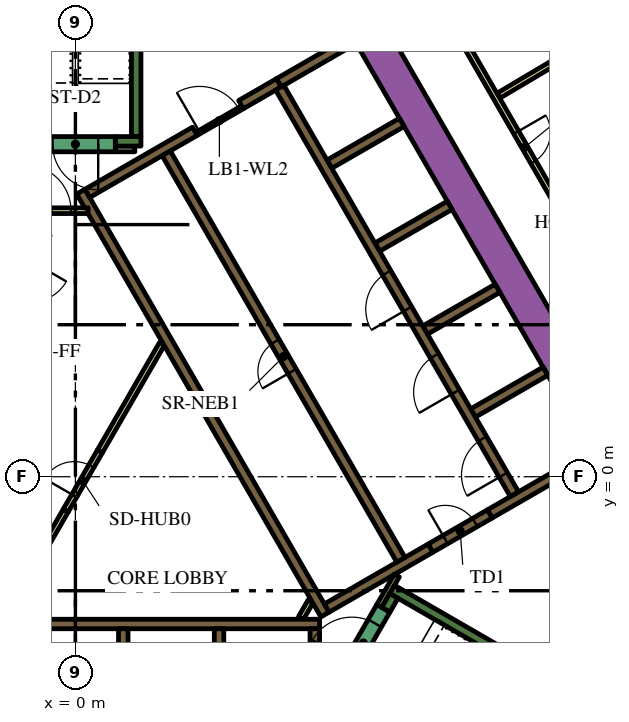
"""IFC4 building model, lengths in metres.
Left out: names, types, materials, properties, quantities, classifications, styles, units other than length and angle.
Written with IfcOpenShell. Run it as: python <this file> out.ifc"""

import sys

from ifc_helpers import new_model, si_unit, direction, frame, frame_2d, origin, place, context, subcontext, project, spatial, polyline, rectangle, outline, extrude, element, fill, save


model = new_model("IFC4")
c1 = context("Model", 3, precision=1e-05, world=origin(), true_north=direction((0.0, 1.0)))
c2 = subcontext(c1, "Body", "Model", "MODEL_VIEW")
j1 = project(units=[si_unit("LENGTHUNIT", "METRE"), si_unit("PLANEANGLEUNIT", "RADIAN")], contexts=[c1])
p1 = place(None, origin())
s1 = spatial("IfcSite", under=j1, at=p1, CompositionType="ELEMENT")
p2 = place(p1, origin())
s2 = spatial("IfcBuilding", under=s1, at=p2, CompositionType="ELEMENT")
p3 = place(p2, frame((0.0, 0.0, 87.6)))
s3 = spatial("IfcBuildingStorey", under=s2, at=p3, CompositionType="ELEMENT", Elevation=87.6)
p4 = place(p3, frame((6.776, 13.364, 0.0), z_axis=(0.0, 0.0, 1.0), x_axis=(0.500004177138, -0.8660229921, 0.0)))
e1 = element("IfcWall", 1, at=p4, inside=s3, PredefinedType="SOLIDWALL", context=c2, shape_type="SweptSolid", body=[
    extrude(rectangle(XDim=20.204, YDim=0.9, at=frame_2d((10.102, 0.0))), origin(), (0.0, 0.0, 1.0), 3.9),
])
p5 = place(p3, frame((11.695, -12.644, 0.0), z_axis=(0.0, 0.0, 1.0), x_axis=(0.500010229568, 0.86601949766, 0.0)))
e2 = element("IfcWall", 2, at=p5, inside=s3, PredefinedType="SOLIDWALL", context=c2, shape_type="SweptSolid", body=[
    extrude(rectangle(XDim=9.326, YDim=0.9, at=frame_2d((4.663, 0.0))), origin(), (0.0, 0.0, 1.0), 3.9),
])
p6 = place(p3, frame((8.334, -2.964, 0.0), z_axis=(0.0, 0.0, 1.0), x_axis=(0.866016039709, -0.500016218704, 0.0)))
e3 = element("IfcWall", 3, at=p6, inside=s3, PredefinedType="SOLIDWALL", context=c2, shape_type="SweptSolid", body=[
    extrude(rectangle(XDim=7.05, YDim=0.25, at=frame_2d((3.525, 0.0))), origin(), (0.0, 0.0, 1.0), 3.9),
])
p7 = place(p3, frame((8.168, -3.503, 0.0), z_axis=(0.0, 0.0, 1.0), x_axis=(0.49972245349, 0.866185586049, 0.0)))
e4 = element("IfcWall", 4, at=p7, inside=s3, PredefinedType="SOLIDWALL", context=c2, shape_type="SweptSolid", body=[
    extrude(rectangle(XDim=0.425, YDim=0.25, at=frame_2d((0.212, 0.0))), origin(), (0.0, 0.0, 1.0), 3.9),
])
p8 = place(p3, frame((1.6, 8.95, 0.0), z_axis=(0.0, 0.0, 1.0), x_axis=(0.0, 1.0, 0.0)))
e5 = element("IfcWall", 5, at=p8, inside=s3, PredefinedType="SOLIDWALL", context=c2, shape_type="SweptSolid", body=[
    extrude(rectangle(XDim=6.8, YDim=0.25, at=frame_2d((3.4, 0.0))), origin(), (0.0, 0.0, 1.0), 3.9),
])
p9 = place(p3, frame((1.05, 8.825, 0.0), z_axis=(0.0, 0.0, 1.0), x_axis=(1.0, 0.0, 0.0)))
e6 = element("IfcWall", 6, at=p9, inside=s3, PredefinedType="SOLIDWALL", context=c2, shape_type="SweptSolid", body=[
    extrude(rectangle(XDim=0.675, YDim=0.25, at=frame_2d((0.337, 0.0))), origin(), (0.0, 0.0, 1.0), 3.9),
])
p10 = place(p3, frame((-5.845, -3.875, 0.0), z_axis=(0.0, 0.0, 1.0), x_axis=(1.0, 0.0, 0.0)))
e7 = element("IfcWall", 7, at=p10, inside=s3, PredefinedType="SOLIDWALL", context=c2, shape_type="SweptSolid", body=[
    extrude(rectangle(XDim=12.27, YDim=0.25, at=frame_2d((6.135, 0.0))), origin(), (0.0, 0.0, 1.0), 3.9),
])
p11 = place(p3, frame((6.3, -7.268, 0.0), z_axis=(0.0, 0.0, 1.0), x_axis=(0.0, 1.0, 0.0)))
e8 = element("IfcWall", 8, at=p11, inside=s3, PredefinedType="SOLIDWALL", context=c2, shape_type="SweptSolid", body=[
    extrude(rectangle(XDim=3.268, YDim=0.25, at=frame_2d((1.634, 0.0))), origin(), (0.0, 0.0, 1.0), 3.9),
])
for number, where, z_axis, x_axis in (
    (9, (3.78, -4.0, 0.0), (0.0, 0.0, 1.0), (0.0, -1.0, 0.0)),
    (10, (1.26, -4.0, 0.0), (0.0, 0.0, 1.0), (0.0, -1.0, 0.0)),
    (11, (10.464, 1.677, 0.0), (0.0, 0.0, 1.0), (0.866, 0.5, 0.0)),
):
    element("IfcWall", number, at=place(p3, frame(where, z_axis=z_axis, x_axis=x_axis)), inside=s3, PredefinedType="SOLIDWALL", context=c2, shape_type="SweptSolid", body=[
        extrude(rectangle(XDim=2.2, YDim=0.25, at=frame_2d((1.1, 0.0))), origin(), (0.0, 0.0, 1.0), 3.9),
    ])
p12 = place(p3, frame((13.629, 0.594, 0.0), z_axis=(0.0, 0.0, 1.0), x_axis=(-0.86602790099, -0.499995674689, 0.0)))
e12 = element("IfcWall", 12, at=p12, inside=s3, PredefinedType="SOLIDWALL", context=c2, shape_type="SweptSolid", body=[
    extrude(rectangle(XDim=3.146, YDim=0.25, at=frame_2d((1.573, 0.0))), origin(), (0.0, 0.0, 1.0), 3.9),
])
p13 = place(p3, origin())
e13 = element("IfcWall", 13, at=p13, inside=s3, PredefinedType="SOLIDWALL", context=c2, shape_type="SweptSolid", body=[
    extrude(outline(polyline([(0.335, 6.925), (0.335, 7.075), (0.335, 7.075), (0.335, 7.075), (0.245, 7.075), (0.079, 7.363), (0.035, 7.439), (0.252, 7.564), (0.377, 7.348), (6.552, -3.348), (6.677, -3.564), (6.46, -3.689), (4.897, -0.981), (0.332, 6.925), (0.335, 6.925), (0.335, 6.925), (0.335, 6.925)])), origin(), (0.0, 0.0, 1.0), 3.9),
])
p14 = place(p3, frame((4.358, 9.791, 0.0), z_axis=(0.0, 0.0, 1.0), x_axis=(0.866079547155, 0.499906209203, 0.0)))
e14 = element("IfcWall", 14, at=p14, inside=s3, PredefinedType="SOLIDWALL", context=c2, shape_type="SweptSolid", body=[
    extrude(rectangle(XDim=1.15, YDim=0.25, at=frame_2d((0.575, 0.0))), origin(), (0.0, 0.0, 1.0), 3.9),
])
p15 = place(p3, frame((5.356, 10.367, 0.0), z_axis=(0.0, 0.0, 1.0), x_axis=(0.865978535641, 0.50008116922, 0.0)))
e15 = element("IfcWall", 15, at=p15, inside=s3, PredefinedType="SOLIDWALL", context=c2, shape_type="SweptSolid", body=[
    extrude(rectangle(XDim=2.278, YDim=0.25, at=frame_2d((1.139, 0.0))), origin(), (0.0, 0.0, 1.0), 3.9),
])
p16 = place(p3, frame((0.314, 7.456, 0.0), z_axis=(0.0, 0.0, 1.0), x_axis=(0.866013897511, 0.50001992892, 0.0)))
e16 = element("IfcWall", 16, at=p16, inside=s3, PredefinedType="SOLIDWALL", context=c2, shape_type="SweptSolid", body=[
    extrude(rectangle(XDim=3.268, YDim=0.25, at=frame_2d((1.634, 0.0))), origin(), (0.0, 0.0, 1.0), 3.9),
])
p17 = place(p3, frame((6.614, -3.456, 0.0), z_axis=(0.0, 0.0, 1.0), x_axis=(0.86602447079, 0.500001615989, 0.0)))
e17 = element("IfcWall", 17, at=p17, inside=s3, PredefinedType="SOLIDWALL", context=c2, shape_type="SweptSolid", body=[
    extrude(rectangle(XDim=3.154, YDim=0.25, at=frame_2d((1.577, 0.0))), origin(), (0.0, 0.0, 1.0), 3.9),
])
for number, where, z_axis, x_axis in (
    (18, (6.684, 8.224, 0.0), (0.0, 0.0, 1.0), (0.866, 0.5, 0.0)),
    (19, (7.944, 6.041, 0.0), (0.0, 0.0, 1.0), (0.866, 0.5, 0.0)),
    (20, (9.204, 3.859, 0.0), (0.0, 0.0, 1.0), (0.866, 0.5, 0.0)),
):
    element("IfcWall", number, at=place(p3, frame(where, z_axis=z_axis, x_axis=x_axis)), inside=s3, PredefinedType="SOLIDWALL", context=c2, shape_type="SweptSolid", body=[
        extrude(rectangle(XDim=2.2, YDim=0.25, at=frame_2d((1.1, 0.0))), origin(), (0.0, 0.0, 1.0), 3.9),
    ])
p18 = place(p3, frame((5.936, -3.718, 0.0), z_axis=(0.0, 0.0, 1.0), x_axis=(0.499890179513, 0.866088799389, 0.0)))
e21 = element("IfcWall", 21, at=p18, inside=s3, PredefinedType="PARTITIONING", context=c2, shape_type="SweptSolid", body=[
    extrude(rectangle(XDim=0.504, YDim=0.15, at=frame_2d((0.252, 0.0))), origin(), (0.0, 0.0, 1.0), 2.75),
])
p19 = place(p3, frame((8.459, -2.599, 0.0), z_axis=(0.0, 0.0, 1.0), x_axis=(-0.500041054325, -0.866001699761, 0.0)))
e22 = element("IfcWall", 22, at=p19, inside=s3, PredefinedType="PARTITIONING", context=c2, shape_type="SweptSolid", body=[
    extrude(rectangle(XDim=0.929, YDim=0.15, at=frame_2d((0.464, 0.0))), origin(), (0.0, 0.0, 1.0), 3.9),
])
for number, where, z_axis, x_axis in (
    (23, (-1.887, -3.718, 0.0), (0.0, 0.0, 1.0), (0.5, 0.866, 0.0)),
    (24, (0.645, 0.667, 0.0), (0.0, 0.0, 1.0), (0.5, 0.866, 0.0)),
):
    element("IfcWall", number, at=place(p3, frame(where, z_axis=z_axis, x_axis=x_axis)), inside=s3, PredefinedType="PARTITIONING", context=c2, shape_type="SweptSolid", body=[
        extrude(rectangle(XDim=3.263, YDim=0.15, at=frame_2d((1.632, 0.0))), origin(), (0.0, 0.0, 1.0), 2.75),
    ])
p20 = place(p3, frame((1.05, 8.625, 0.0), z_axis=(0.0, 0.0, 1.0), x_axis=(1.0, 0.0, 0.0)))
e25 = element("IfcWall", 25, at=p20, inside=s3, PredefinedType="PARTITIONING", context=c2, shape_type="SweptSolid", body=[
    extrude(rectangle(XDim=0.514, YDim=0.15, at=frame_2d((0.257, 0.0))), origin(), (0.0, 0.0, 1.0), 2.75),
])
p21 = place(p3, frame((11.553, -0.46, 0.0), z_axis=(0.0, 0.0, 1.0), x_axis=(-0.500006514828, 0.866021642414, 0.0)))
e26 = element("IfcWall", 26, at=p21, inside=s3, PredefinedType="SOLIDWALL", context=c2, shape_type="SweptSolid", body=[
    extrude(rectangle(XDim=12.35, YDim=0.25, at=frame_2d((6.175, 0.0))), origin(), (0.0, 0.0, 1.0), 3.9),
])
p22 = place(p21, frame((0.585, 0.0, 0.0)))
e27 = element("IfcOpeningElement", 27, at=p22, cuts=e26, PredefinedType="OPENING", context=c2, shape_type="SweptSolid", body=[
    extrude(rectangle(XDim=1.1, YDim=2.1, at=frame_2d((0.55, 1.05))), frame((0.0, 0.135, 0.0), z_axis=(0.0, -1.0, 0.0), x_axis=(1.0, 0.0, 0.0)), (0.0, 0.0, 1.0), 0.27),
])
p23 = place(p21, frame((3.105, 0.0, 0.0)))
e28 = element("IfcOpeningElement", 28, at=p23, cuts=e26, PredefinedType="OPENING", context=c2, shape_type="SweptSolid", body=[
    extrude(rectangle(XDim=1.1, YDim=2.1, at=frame_2d((0.55, 1.05))), frame((0.0, 0.135, 0.0), z_axis=(0.0, -1.0, 0.0), x_axis=(1.0, 0.0, 0.0)), (0.0, 0.0, 1.0), 0.27),
])
p24 = place(p21, frame((5.625, 0.0, 0.0)))
e29 = element("IfcOpeningElement", 29, at=p24, cuts=e26, PredefinedType="OPENING", context=c2, shape_type="SweptSolid", body=[
    extrude(rectangle(XDim=1.1, YDim=2.1, at=frame_2d((0.55, 1.05))), frame((0.0, 0.135, 0.0), z_axis=(0.0, -1.0, 0.0), x_axis=(1.0, 0.0, 0.0)), (0.0, 0.0, 1.0), 0.27),
])
p25 = place(p3, frame((8.565, -2.185, 0.0), z_axis=(0.0, 0.0, 1.0), x_axis=(-0.499997954832, 0.866026584559, 0.0)))
e30 = element("IfcWall", 30, at=p25, inside=s3, PredefinedType="SOLIDWALL", context=c2, shape_type="SweptSolid", body=[
    extrude(rectangle(XDim=12.35, YDim=0.25, at=frame_2d((6.175, 0.0))), origin(), (0.0, 0.0, 1.0), 3.9),
])
p26 = place(p25, frame((5.725, 0.0, 0.0)))
e31 = element("IfcOpeningElement", 31, at=p26, cuts=e30, PredefinedType="OPENING", context=c2, shape_type="SweptSolid", body=[
    extrude(rectangle(XDim=0.9, YDim=2.1, at=frame_2d((0.45, 1.05))), frame((0.0, 0.135, 0.0), z_axis=(0.0, -1.0, 0.0), x_axis=(1.0, 0.0, 0.0)), (0.0, 0.0, 1.0), 0.27),
])
p27 = place(p3, frame((7.053, -5.284, 0.0), z_axis=(0.0, 0.0, 1.0), x_axis=(0.500078061341, 0.865980330357, 0.0)))
e32 = element("IfcWall", 32, at=p27, inside=s3, PredefinedType="SOLIDWALL", context=c2, shape_type="SweptSolid", body=[
    extrude(rectangle(XDim=2.1, YDim=0.4, at=frame_2d((1.05, 0.0))), origin(), (0.0, 0.0, 1.0), 3.9),
])
p28 = place(p27, frame((0.45, 0.0, 0.0)))
e33 = element("IfcOpeningElement", 33, at=p28, cuts=e32, PredefinedType="OPENING", context=c2, shape_type="SweptSolid", body=[
    extrude(rectangle(XDim=1.2, YDim=2.1, at=frame_2d((0.6, 1.05))), frame((0.0, 0.21, 0.0), z_axis=(0.0, -1.0, 0.0), x_axis=(1.0, 0.0, 0.0)), (0.0, 0.0, 1.0), 0.42),
])
p29 = place(p3, frame((9.346, -1.879, 0.0), z_axis=(0.0, 0.0, 1.0), x_axis=(0.866047807691, 0.499961193289, 0.0)))
e34 = element("IfcWall", 34, at=p29, inside=s3, PredefinedType="SOLIDWALL", context=c2, shape_type="SweptSolid", body=[
    extrude(rectangle(XDim=1.8, YDim=0.25, at=frame_2d((0.9, 0.0))), origin(), (0.0, 0.0, 1.0), 3.9),
])
p30 = place(p29, frame((0.45, 0.0, 0.0)))
e35 = element("IfcOpeningElement", 35, at=p30, cuts=e34, PredefinedType="OPENING", context=c2, shape_type="SweptSolid", body=[
    extrude(rectangle(XDim=0.9, YDim=2.1, at=frame_2d((0.45, 1.05))), frame((0.0, 0.135, 0.0), z_axis=(0.0, -1.0, 0.0), x_axis=(1.0, 0.0, 0.0)), (0.0, 0.0, 1.0), 0.27),
])
p31 = place(p3, frame((1.05, 8.75, 0.0), z_axis=(0.0, 0.0, 1.0), x_axis=(-1.0, 0.0, 0.0)))
e36 = element("IfcWall", 36, at=p31, inside=s3, PredefinedType="SOLIDWALL", context=c2, shape_type="SweptSolid", body=[
    extrude(rectangle(XDim=2.1, YDim=0.4, at=frame_2d((1.05, 0.0))), origin(), (0.0, 0.0, 1.0), 3.9),
])
p32 = place(p31, frame((0.45, 0.0, 0.0)))
e37 = element("IfcOpeningElement", 37, at=p32, cuts=e36, PredefinedType="OPENING", context=c2, shape_type="SweptSolid", body=[
    extrude(rectangle(XDim=1.2, YDim=2.1, at=frame_2d((0.6, 1.05))), frame((0.0, 0.21, 0.0), z_axis=(0.0, -1.0, 0.0), x_axis=(1.0, 0.0, 0.0)), (0.0, 0.0, 1.0), 0.42),
])
p33 = place(p3, frame((-1.765, 7.0, 0.0), z_axis=(0.0, 0.0, 1.0), x_axis=(1.0, 0.0, 0.0)))
e38 = element("IfcWall", 38, at=p33, inside=s3, PredefinedType="PARTITIONING", context=c2, shape_type="SweptSolid", body=[
    extrude(rectangle(XDim=2.1, YDim=0.15, at=frame_2d((1.05, 0.0))), origin(), (0.0, 0.0, 1.0), 2.75),
])
p34 = place(p33, frame((0.45, 0.0, 0.0)))
e39 = element("IfcOpeningElement", 39, at=p34, cuts=e38, PredefinedType="OPENING", context=c2, shape_type="SweptSolid", body=[
    extrude(rectangle(XDim=1.2, YDim=2.1, at=frame_2d((0.6, 1.05))), frame((0.0, 0.085, 0.0), z_axis=(0.0, -1.0, 0.0), x_axis=(1.0, 0.0, 0.0)), (0.0, 0.0, 1.0), 0.17),
])
p35 = place(p3, frame((3.183, 9.02, 0.0), z_axis=(0.0, 0.0, 1.0), x_axis=(0.866034573852, 0.49998411664, 0.0)))
e40 = element("IfcWall", 40, at=p35, inside=s3, PredefinedType="PARTITIONING", context=c2, shape_type="SweptSolid", body=[
    extrude(rectangle(XDim=1.4, YDim=0.09, at=frame_2d((0.7, 0.0))), origin(), (0.0, 0.0, 1.0), 2.75),
])
p36 = place(p35, frame((0.1, 0.0, 0.0)))
e41 = element("IfcOpeningElement", 41, at=p36, cuts=e40, PredefinedType="OPENING", context=c2, shape_type="SweptSolid", body=[
    extrude(rectangle(XDim=1.2, YDim=2.1, at=frame_2d((0.6, 1.05))), frame((0.0, 0.055, 0.0), z_axis=(0.0, -1.0, 0.0), x_axis=(1.0, 0.0, 0.0)), (0.0, 0.0, 1.0), 0.11),
])
p37 = place(p3, frame((-0.255, -0.892, 0.0), z_axis=(0.0, 0.0, 1.0), x_axis=(0.500062916607, 0.865989075817, 0.0)))
e42 = element("IfcWall", 42, at=p37, inside=s3, PredefinedType="PARTITIONING", context=c2, shape_type="SweptSolid", body=[
    extrude(rectangle(XDim=1.8, YDim=0.15, at=frame_2d((0.9, 0.0))), origin(), (0.0, 0.0, 1.0), 2.75),
])
p38 = place(p37, frame((0.45, 0.0, 0.0)))
e43 = element("IfcOpeningElement", 43, at=p38, cuts=e42, PredefinedType="OPENING", context=c2, shape_type="SweptSolid", body=[
    extrude(rectangle(XDim=0.9, YDim=2.1, at=frame_2d((0.45, 1.05))), frame((0.0, 0.085, 0.0), z_axis=(0.0, -1.0, 0.0), x_axis=(1.0, 0.0, 0.0)), (0.0, 0.0, 1.0), 0.17),
])
p39 = place(p3, frame((6.163, 18.475, 0.0), z_axis=(0.0, 0.0, 1.0), x_axis=(0.500001317485, -0.866024643133, 0.0)))
e44 = element("IfcWall", 44, at=p39, inside=s3, PredefinedType="PARTITIONING", context=c2, shape_type="SweptSolid", body=[
    extrude(rectangle(XDim=25.767, YDim=0.15, at=frame_2d((12.883, 0.0))), origin(), (0.0, 0.0, 1.0), 2.75),
])
p40 = place(p39, frame((24.241, 0.0, 0.0)))
e45 = element("IfcOpeningElement", 45, at=p40, cuts=e44, PredefinedType="OPENING", context=c2, shape_type="SweptSolid", body=[
    extrude(rectangle(XDim=1.0, YDim=2.1, at=frame_2d((0.5, 1.05))), frame((0.0, 0.085, 0.0), z_axis=(0.0, -1.0, 0.0), x_axis=(1.0, 0.0, 0.0)), (0.0, 0.0, 1.0), 0.17),
])
p41 = place(p39, frame((13.144, 0.0, 0.0)))
e46 = element("IfcOpeningElement", 46, at=p41, cuts=e44, PredefinedType="OPENING", context=c2, shape_type="SweptSolid", body=[
    extrude(rectangle(XDim=1.0, YDim=2.1, at=frame_2d((0.5, 1.05))), frame((0.0, 0.085, 0.0), z_axis=(0.0, -1.0, 0.0), x_axis=(1.0, 0.0, 0.0)), (0.0, 0.0, 1.0), 0.17),
])
p42 = place(p39, frame((10.874, 0.0, 0.0)))
e47 = element("IfcOpeningElement", 47, at=p42, cuts=e44, PredefinedType="OPENING", context=c2, shape_type="SweptSolid", body=[
    extrude(rectangle(XDim=0.9, YDim=2.1, at=frame_2d((0.45, 1.05))), frame((0.0, 0.085, 0.0), z_axis=(0.0, -1.0, 0.0), x_axis=(1.0, 0.0, 0.0)), (0.0, 0.0, 1.0), 0.17),
])
p43 = place(p39, frame((3.718, 0.0, 0.0)))
e48 = element("IfcOpeningElement", 48, at=p43, cuts=e44, PredefinedType="OPENING", context=c2, shape_type="SweptSolid", body=[
    extrude(rectangle(XDim=1.1, YDim=2.1, at=frame_2d((0.55, 1.05))), frame((0.0, 0.085, 0.0), z_axis=(0.0, -1.0, 0.0), x_axis=(1.0, 0.0, 0.0)), (0.0, 0.0, 1.0), 0.17),
])
p44 = place(p39, frame((2.411, 0.0, 0.0)))
e49 = element("IfcOpeningElement", 49, at=p44, cuts=e44, PredefinedType="OPENING", context=c2, shape_type="SweptSolid", body=[
    extrude(rectangle(XDim=1.0, YDim=2.1, at=frame_2d((0.5, 1.05))), frame((0.0, 0.085, 0.0), z_axis=(0.0, -1.0, 0.0), x_axis=(1.0, 0.0, 0.0)), (0.0, 0.0, 1.0), 0.17),
])
p45 = place(p3, frame((17.379, 13.731, 0.0), z_axis=(0.0, 0.0, 1.0), x_axis=(-0.860132461691, -0.510070728768, 0.0)))
e50 = element("IfcWall", 50, at=p45, inside=s3, PredefinedType="PARTITIONING", context=c2, shape_type="SweptSolid", body=[
    extrude(rectangle(XDim=7.257, YDim=0.15, at=frame_2d((3.628, 0.0))), origin(), (0.0, 0.0, 1.0), 2.75),
])
p46 = place(p22, origin())
e51 = element("IfcDoor", 51, at=p46, inside=s3, OperationType="DOUBLE_DOOR_SLIDING", PredefinedType="DOOR", context=c2, shape_type="SweptSolid", body=[
    extrude(rectangle(XDim=1.1, YDim=2.1, at=frame_2d((0.55, 1.05))), frame((0.0, 0.025, 0.0), z_axis=(0.0, -1.0, 0.0), x_axis=(1.0, 0.0, 0.0)), (0.0, 0.0, 1.0), 0.05),
])
fill(e27, e51)
p47 = place(p23, origin())
e52 = element("IfcDoor", 52, at=p47, inside=s3, OperationType="DOUBLE_DOOR_SLIDING", PredefinedType="DOOR", context=c2, shape_type="SweptSolid", body=[
    extrude(rectangle(XDim=1.1, YDim=2.1, at=frame_2d((0.55, 1.05))), frame((0.0, 0.025, 0.0), z_axis=(0.0, -1.0, 0.0), x_axis=(1.0, 0.0, 0.0)), (0.0, 0.0, 1.0), 0.05),
])
fill(e28, e52)
p48 = place(p24, origin())
e53 = element("IfcDoor", 53, at=p48, inside=s3, OperationType="DOUBLE_DOOR_SLIDING", PredefinedType="DOOR", context=c2, shape_type="SweptSolid", body=[
    extrude(rectangle(XDim=1.1, YDim=2.1, at=frame_2d((0.55, 1.05))), frame((0.0, 0.025, 0.0), z_axis=(0.0, -1.0, 0.0), x_axis=(1.0, 0.0, 0.0)), (0.0, 0.0, 1.0), 0.05),
])
fill(e29, e53)
p49 = place(p26, origin())
e54 = element("IfcDoor", 54, at=p49, inside=s3, OperationType="SINGLE_SWING_LEFT", PredefinedType="DOOR", context=c2, shape_type="SweptSolid", body=[
    extrude(rectangle(XDim=0.9, YDim=2.1, at=frame_2d((0.45, 1.05))), frame((0.0, 0.025, 0.0), z_axis=(0.0, -1.0, 0.0), x_axis=(1.0, 0.0, 0.0)), (0.0, 0.0, 1.0), 0.05),
])
fill(e31, e54)
p50 = place(p28, origin())
e55 = element("IfcDoor", 55, at=p50, inside=s3, OperationType="SINGLE_SWING_LEFT", PredefinedType="DOOR", context=c2, shape_type="SweptSolid", body=[
    extrude(rectangle(XDim=1.2, YDim=2.1, at=frame_2d((0.6, 1.05))), frame((0.0, 0.025, 0.0), z_axis=(0.0, -1.0, 0.0), x_axis=(1.0, 0.0, 0.0)), (0.0, 0.0, 1.0), 0.05),
])
fill(e33, e55)
p51 = place(p30, origin())
e56 = element("IfcDoor", 56, at=p51, inside=s3, OperationType="SINGLE_SWING_LEFT", PredefinedType="DOOR", context=c2, shape_type="SweptSolid", body=[
    extrude(rectangle(XDim=0.9, YDim=2.1, at=frame_2d((0.45, 1.05))), frame((0.0, 0.025, 0.0), z_axis=(0.0, -1.0, 0.0), x_axis=(1.0, 0.0, 0.0)), (0.0, 0.0, 1.0), 0.05),
])
fill(e35, e56)
p52 = place(p32, origin())
e57 = element("IfcDoor", 57, at=p52, inside=s3, OperationType="SINGLE_SWING_LEFT", PredefinedType="DOOR", context=c2, shape_type="SweptSolid", body=[
    extrude(rectangle(XDim=1.2, YDim=2.1, at=frame_2d((0.6, 1.05))), frame((0.0, 0.025, 0.0), z_axis=(0.0, -1.0, 0.0), x_axis=(1.0, 0.0, 0.0)), (0.0, 0.0, 1.0), 0.05),
])
fill(e37, e57)
p53 = place(p34, origin())
e58 = element("IfcDoor", 58, at=p53, inside=s3, OperationType="SINGLE_SWING_LEFT", PredefinedType="DOOR", context=c2, shape_type="SweptSolid", body=[
    extrude(rectangle(XDim=1.2, YDim=2.1, at=frame_2d((0.6, 1.05))), frame((0.0, 0.025, 0.0), z_axis=(0.0, -1.0, 0.0), x_axis=(1.0, 0.0, 0.0)), (0.0, 0.0, 1.0), 0.05),
])
fill(e39, e58)
p54 = place(p36, origin())
e59 = element("IfcDoor", 59, at=p54, inside=s3, OperationType="SINGLE_SWING_LEFT", PredefinedType="DOOR", context=c2, shape_type="SweptSolid", body=[
    extrude(rectangle(XDim=1.2, YDim=2.1, at=frame_2d((0.6, 1.05))), frame((0.0, 0.025, 0.0), z_axis=(0.0, -1.0, 0.0), x_axis=(1.0, 0.0, 0.0)), (0.0, 0.0, 1.0), 0.05),
])
fill(e41, e59)
p55 = place(p38, origin())
e60 = element("IfcDoor", 60, at=p55, inside=s3, OperationType="SINGLE_SWING_LEFT", PredefinedType="DOOR", context=c2, shape_type="SweptSolid", body=[
    extrude(rectangle(XDim=0.9, YDim=2.1, at=frame_2d((0.45, 1.05))), frame((0.0, 0.025, 0.0), z_axis=(0.0, -1.0, 0.0), x_axis=(1.0, 0.0, 0.0)), (0.0, 0.0, 1.0), 0.05),
])
fill(e43, e60)
p56 = place(p42, origin())
e61 = element("IfcDoor", 61, at=p56, inside=s3, OperationType="SINGLE_SWING_RIGHT", PredefinedType="DOOR", context=c2, shape_type="SweptSolid", body=[
    extrude(rectangle(XDim=0.9, YDim=2.1, at=frame_2d((0.45, 1.05))), frame((0.0, 0.025, 0.0), z_axis=(0.0, -1.0, 0.0), x_axis=(1.0, 0.0, 0.0)), (0.0, 0.0, 1.0), 0.05),
])
fill(e47, e61)
save(model, sys.argv[1])
